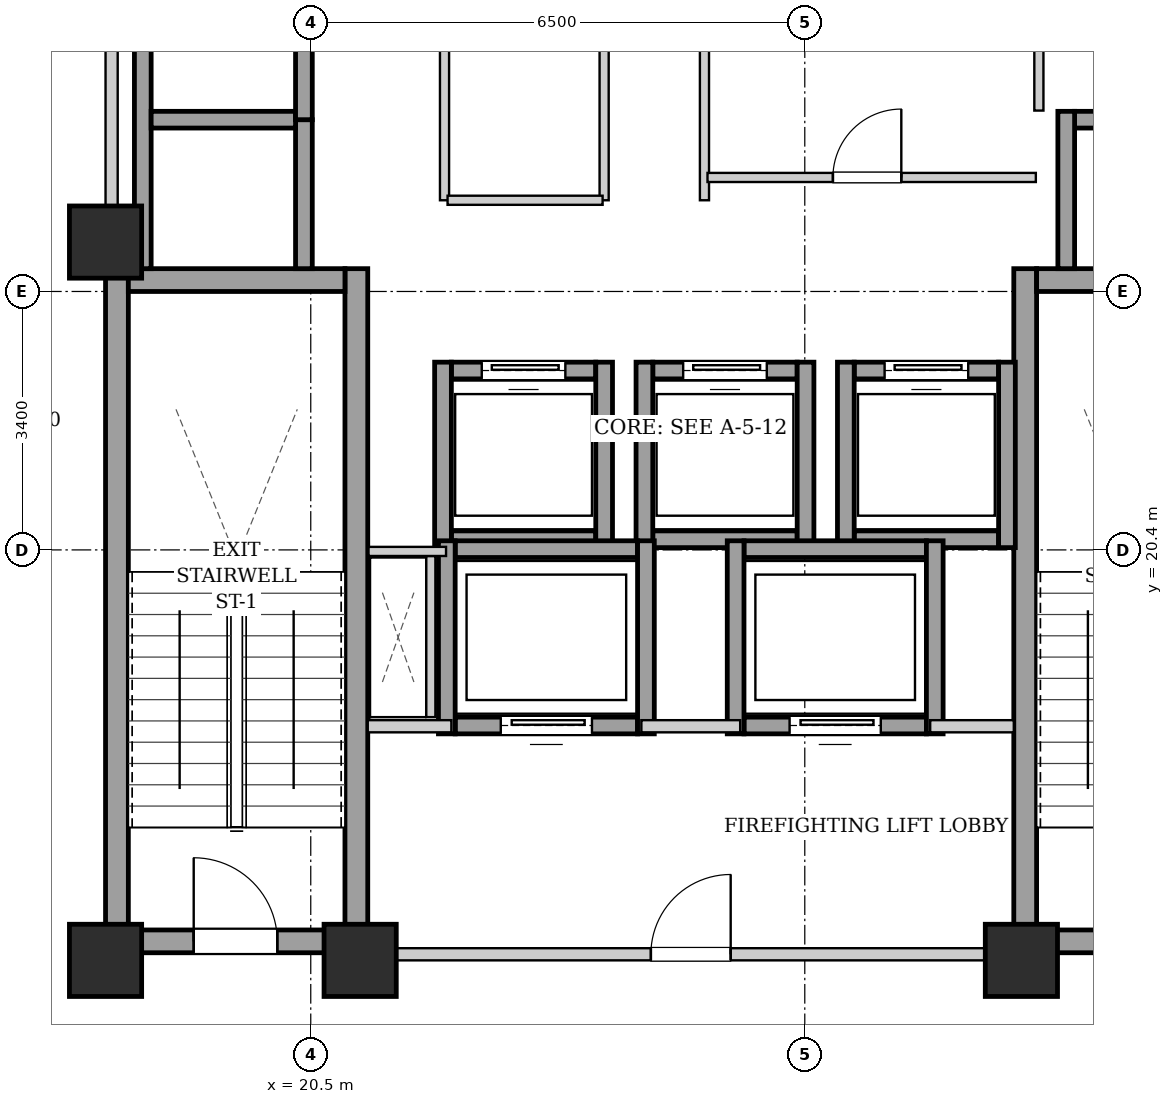
"""IFC4 building model, lengths in metres.
Left out: names, types, materials, properties, quantities, classifications, styles, units other than length and angle.
Written with IfcOpenShell. Run it as: python <this file> out.ifc"""

import sys

from ifc_helpers import new_model, si_unit, direction, frame, frame_2d, origin, origin_2d, place, context, subcontext, project, spatial, rectangle, extrude, element, fill, save


model = new_model("IFC4")
c1 = context("Model", 3, precision=1e-05, world=origin(), true_north=direction((0.0, 1.0)))
c2 = subcontext(c1, "Body", "Model", "MODEL_VIEW")
j1 = project(units=[si_unit("LENGTHUNIT", "METRE"), si_unit("PLANEANGLEUNIT", "RADIAN")], contexts=[c1])
p1 = place(None, origin())
s1 = spatial("IfcSite", under=j1, at=p1, CompositionType="ELEMENT")
p2 = place(p1, origin())
s2 = spatial("IfcBuilding", under=s1, at=p2, CompositionType="ELEMENT")
p3 = place(p2, frame((0.0, 0.0, 169.9)))
s3 = spatial("IfcBuildingStorey", under=s2, at=p3, CompositionType="ELEMENT", Elevation=169.9)
for number, where, z_axis, x_axis in (
    (1, (17.8, 15.0, 0.0), (0.0, 0.0, 1.0), (1.0, 0.0, 0.0)),
    (2, (21.15, 15.0, 0.0), (0.0, 0.0, 1.0), (1.0, 0.0, 0.0)),
    (3, (29.85, 15.0, 0.0), (0.0, 0.0, 1.0), (1.0, 0.0, 0.0)),
    (4, (17.8, 24.45, 0.0), (0.0, 0.0, 1.0), (1.0, 0.0, 0.0)),
):
    element("IfcColumn", number, at=place(p3, frame(where, z_axis=z_axis, x_axis=x_axis)), inside=s3, PredefinedType="COLUMN", context=c2, shape_type="SweptSolid", body=[
        extrude(rectangle(XDim=0.95, YDim=0.95, at=origin_2d()), origin(), (0.0, 0.0, 1.0), 4.5),
    ])
for number, where, z_axis, x_axis in (
    (5, (17.95, 15.1, 0.0), (0.0, 0.0, 1.0), (0.0, 1.0, 0.0)),
    (6, (21.1, 15.1, 0.0), (0.0, 0.0, 1.0), (0.0, 1.0, 0.0)),
):
    element("IfcWall", number, at=place(p3, frame(where, z_axis=z_axis, x_axis=x_axis)), inside=s3, PredefinedType="SHEAR", context=c2, shape_type="SweptSolid", body=[
        extrude(rectangle(XDim=9.0, YDim=0.3, at=frame_2d((4.5, 0.0))), origin(), (0.0, 0.0, 1.0), 4.18),
    ])
p4 = place(p3, frame((18.1, 23.95, 0.0), z_axis=(0.0, 0.0, 1.0), x_axis=(1.0, 0.0, 0.0)))
e7 = element("IfcWall", 7, at=p4, inside=s3, PredefinedType="SHEAR", context=c2, shape_type="SweptSolid", body=[
    extrude(rectangle(XDim=2.85, YDim=0.3, at=frame_2d((1.425, 0.0))), origin(), (0.0, 0.0, 1.0), 4.18),
])
p5 = place(p3, frame((18.1, 15.25, 0.0), z_axis=(0.0, 0.0, 1.0), x_axis=(1.0, 0.0, 0.0)))
e8 = element("IfcWall", 8, at=p5, inside=s3, PredefinedType="SHEAR", context=c2, shape_type="SweptSolid", body=[
    extrude(rectangle(XDim=2.85, YDim=0.3, at=frame_2d((1.425, 0.0))), origin(), (0.0, 0.0, 1.0), 4.18),
])
p6 = place(p5, frame((0.86, 0.0, 0.0)))
e9 = element("IfcOpeningElement", 9, at=p6, cuts=e8, PredefinedType="OPENING", context=c2, shape_type="SweptSolid", body=[
    extrude(rectangle(XDim=1.1, YDim=2.05, at=frame_2d((0.55, 1.025))), frame((0.0, 0.16, 0.0), z_axis=(0.0, -1.0, 0.0), x_axis=(1.0, 0.0, 0.0)), (0.0, 0.0, 1.0), 0.32),
])
p7 = place(p3, frame((29.9, 15.1, 0.0), z_axis=(0.0, 0.0, 1.0), x_axis=(0.0, 1.0, 0.0)))
e10 = element("IfcWall", 10, at=p7, inside=s3, PredefinedType="SHEAR", context=c2, shape_type="SweptSolid", body=[
    extrude(rectangle(XDim=9.0, YDim=0.3, at=frame_2d((4.5, 0.0))), origin(), (0.0, 0.0, 1.0), 4.18),
])
p8 = place(p3, frame((30.05, 23.95, 0.0), z_axis=(0.0, 0.0, 1.0), x_axis=(1.0, 0.0, 0.0)))
e11 = element("IfcWall", 11, at=p8, inside=s3, PredefinedType="SHEAR", context=c2, shape_type="SweptSolid", body=[
    extrude(rectangle(XDim=2.85, YDim=0.3, at=frame_2d((1.425, 0.0))), origin(), (0.0, 0.0, 1.0), 4.18),
])
p9 = place(p3, frame((30.05, 15.25, 0.0), z_axis=(0.0, 0.0, 1.0), x_axis=(1.0, 0.0, 0.0)))
e12 = element("IfcWall", 12, at=p9, inside=s3, PredefinedType="SHEAR", context=c2, shape_type="SweptSolid", body=[
    extrude(rectangle(XDim=2.85, YDim=0.3, at=frame_2d((1.425, 0.0))), origin(), (0.0, 0.0, 1.0), 4.18),
])
p10 = place(p9, frame((0.86, 0.0, 0.0)))
e13 = element("IfcOpeningElement", 13, at=p10, cuts=e12, PredefinedType="OPENING", context=c2, shape_type="SweptSolid", body=[
    extrude(rectangle(XDim=1.1, YDim=2.05, at=frame_2d((0.55, 1.025))), frame((0.0, 0.16, 0.0), z_axis=(0.0, -1.0, 0.0), x_axis=(1.0, 0.0, 0.0)), (0.0, 0.0, 1.0), 0.32),
])
p11 = place(p3, frame((22.35, 20.54, 0.0), z_axis=(0.0, 0.0, 1.0), x_axis=(1.0, 0.0, 0.0)))
e14 = element("IfcWall", 14, at=p11, inside=s3, PredefinedType="SHEAR", context=c2, shape_type="SweptSolid", body=[
    extrude(rectangle(XDim=1.9, YDim=0.22, at=frame_2d((0.95, 0.0))), origin(), (0.0, 0.0, 1.0), 4.18),
])
p12 = place(p3, frame((22.35, 22.76, 0.0), z_axis=(0.0, 0.0, 1.0), x_axis=(1.0, 0.0, 0.0)))
e15 = element("IfcWall", 15, at=p12, inside=s3, PredefinedType="SHEAR", context=c2, shape_type="SweptSolid", body=[
    extrude(rectangle(XDim=1.9, YDim=0.22, at=frame_2d((0.95, 0.0))), origin(), (0.0, 0.0, 1.0), 4.18),
])
p13 = place(p12, frame((0.4, 0.0, 0.0)))
e16 = element("IfcOpeningElement", 16, at=p13, cuts=e15, PredefinedType="OPENING", context=c2, shape_type="SweptSolid", body=[
    extrude(rectangle(XDim=1.1, YDim=2.15, at=frame_2d((0.55, 1.075))), frame((0.0, 0.12, 0.0), z_axis=(0.0, -1.0, 0.0), x_axis=(1.0, 0.0, 0.0)), (0.0, 0.0, 1.0), 0.24),
])
for number, where, z_axis, x_axis in (
    (17, (22.24, 20.43, 0.0), (0.0, 0.0, 1.0), (0.0, 1.0, 0.0)),
    (18, (24.36, 20.43, 0.0), (0.0, 0.0, 1.0), (0.0, 1.0, 0.0)),
):
    element("IfcWall", number, at=place(p3, frame(where, z_axis=z_axis, x_axis=x_axis)), inside=s3, PredefinedType="SHEAR", context=c2, shape_type="SweptSolid", body=[
        extrude(rectangle(XDim=2.44, YDim=0.22, at=frame_2d((1.22, 0.0))), origin(), (0.0, 0.0, 1.0), 4.18),
    ])
p14 = place(p3, frame((25.0, 20.54, 0.0), z_axis=(0.0, 0.0, 1.0), x_axis=(1.0, 0.0, 0.0)))
e19 = element("IfcWall", 19, at=p14, inside=s3, PredefinedType="SHEAR", context=c2, shape_type="SweptSolid", body=[
    extrude(rectangle(XDim=1.9, YDim=0.22, at=frame_2d((0.95, 0.0))), origin(), (0.0, 0.0, 1.0), 4.18),
])
p15 = place(p3, frame((25.0, 22.76, 0.0), z_axis=(0.0, 0.0, 1.0), x_axis=(1.0, 0.0, 0.0)))
e20 = element("IfcWall", 20, at=p15, inside=s3, PredefinedType="SHEAR", context=c2, shape_type="SweptSolid", body=[
    extrude(rectangle(XDim=1.9, YDim=0.22, at=frame_2d((0.95, 0.0))), origin(), (0.0, 0.0, 1.0), 4.18),
])
p16 = place(p15, frame((0.4, 0.0, 0.0)))
e21 = element("IfcOpeningElement", 21, at=p16, cuts=e20, PredefinedType="OPENING", context=c2, shape_type="SweptSolid", body=[
    extrude(rectangle(XDim=1.1, YDim=2.15, at=frame_2d((0.55, 1.075))), frame((0.0, 0.12, 0.0), z_axis=(0.0, -1.0, 0.0), x_axis=(1.0, 0.0, 0.0)), (0.0, 0.0, 1.0), 0.24),
])
for number, where, z_axis, x_axis in (
    (22, (24.89, 20.43, 0.0), (0.0, 0.0, 1.0), (0.0, 1.0, 0.0)),
    (23, (27.01, 20.43, 0.0), (0.0, 0.0, 1.0), (0.0, 1.0, 0.0)),
):
    element("IfcWall", number, at=place(p3, frame(where, z_axis=z_axis, x_axis=x_axis)), inside=s3, PredefinedType="SHEAR", context=c2, shape_type="SweptSolid", body=[
        extrude(rectangle(XDim=2.44, YDim=0.22, at=frame_2d((1.22, 0.0))), origin(), (0.0, 0.0, 1.0), 4.18),
    ])
p17 = place(p3, frame((27.65, 20.54, 0.0), z_axis=(0.0, 0.0, 1.0), x_axis=(1.0, 0.0, 0.0)))
e24 = element("IfcWall", 24, at=p17, inside=s3, PredefinedType="SHEAR", context=c2, shape_type="SweptSolid", body=[
    extrude(rectangle(XDim=1.9, YDim=0.22, at=frame_2d((0.95, 0.0))), origin(), (0.0, 0.0, 1.0), 4.18),
])
p18 = place(p3, frame((27.65, 22.76, 0.0), z_axis=(0.0, 0.0, 1.0), x_axis=(1.0, 0.0, 0.0)))
e25 = element("IfcWall", 25, at=p18, inside=s3, PredefinedType="SHEAR", context=c2, shape_type="SweptSolid", body=[
    extrude(rectangle(XDim=1.9, YDim=0.22, at=frame_2d((0.95, 0.0))), origin(), (0.0, 0.0, 1.0), 4.18),
])
p19 = place(p18, frame((0.4, 0.0, 0.0)))
e26 = element("IfcOpeningElement", 26, at=p19, cuts=e25, PredefinedType="OPENING", context=c2, shape_type="SweptSolid", body=[
    extrude(rectangle(XDim=1.1, YDim=2.15, at=frame_2d((0.55, 1.075))), frame((0.0, 0.12, 0.0), z_axis=(0.0, -1.0, 0.0), x_axis=(1.0, 0.0, 0.0)), (0.0, 0.0, 1.0), 0.24),
])
for number, where, z_axis, x_axis in (
    (27, (27.54, 20.43, 0.0), (0.0, 0.0, 1.0), (0.0, 1.0, 0.0)),
    (28, (29.66, 20.43, 0.0), (0.0, 0.0, 1.0), (0.0, 1.0, 0.0)),
):
    element("IfcWall", number, at=place(p3, frame(where, z_axis=z_axis, x_axis=x_axis)), inside=s3, PredefinedType="SHEAR", context=c2, shape_type="SweptSolid", body=[
        extrude(rectangle(XDim=2.44, YDim=0.22, at=frame_2d((1.22, 0.0))), origin(), (0.0, 0.0, 1.0), 4.18),
    ])
p20 = place(p3, frame((18.29, 24.1, 0.0), z_axis=(0.0, 0.0, 1.0), x_axis=(0.0, 1.0, 0.0)))
e29 = element("IfcWall", 29, at=p20, inside=s3, PredefinedType="SHEAR", context=c2, shape_type="SweptSolid", body=[
    extrude(rectangle(XDim=4.14, YDim=0.22, at=frame_2d((2.07, 0.0))), origin(), (0.0, 0.0, 1.0), 4.18),
])
p21 = place(p3, frame((20.41, 24.1, 0.0), z_axis=(0.0, 0.0, 1.0), x_axis=(0.0, 1.0, 0.0)))
e30 = element("IfcWall", 30, at=p21, inside=s3, PredefinedType="SHEAR", context=c2, shape_type="SweptSolid", body=[
    extrude(rectangle(XDim=1.96, YDim=0.22, at=frame_2d((0.98, 0.0))), origin(), (0.0, 0.0, 1.0), 4.18),
])
p22 = place(p3, frame((18.4, 26.06, 0.0), z_axis=(0.0, 0.0, 1.0), x_axis=(1.0, 0.0, 0.0)))
e31 = element("IfcWall", 31, at=p22, inside=s3, PredefinedType="SHEAR", context=c2, shape_type="SweptSolid", body=[
    extrude(rectangle(XDim=1.9, YDim=0.22, at=frame_2d((0.95, 0.0))), origin(), (0.0, 0.0, 1.0), 4.18),
])
p23 = place(p3, frame((20.41, 26.06, 0.0), z_axis=(0.0, 0.0, 1.0), x_axis=(0.0, 1.0, 0.0)))
e32 = element("IfcWall", 32, at=p23, inside=s3, PredefinedType="SHEAR", context=c2, shape_type="SweptSolid", body=[
    extrude(rectangle(XDim=2.18, YDim=0.22, at=frame_2d((1.09, 0.0))), origin(), (0.0, 0.0, 1.0), 4.18),
])
p24 = place(p3, frame((30.55, 26.06, 0.0), z_axis=(0.0, 0.0, 1.0), x_axis=(1.0, 0.0, 0.0)))
e33 = element("IfcWall", 33, at=p24, inside=s3, PredefinedType="SHEAR", context=c2, shape_type="SweptSolid", body=[
    extrude(rectangle(XDim=1.9, YDim=0.22, at=frame_2d((0.95, 0.0))), origin(), (0.0, 0.0, 1.0), 4.18),
])
p25 = place(p3, frame((30.44, 24.1, 0.0), z_axis=(0.0, 0.0, 1.0), x_axis=(0.0, 1.0, 0.0)))
e34 = element("IfcWall", 34, at=p25, inside=s3, PredefinedType="SHEAR", context=c2, shape_type="SweptSolid", body=[
    extrude(rectangle(XDim=2.07, YDim=0.22, at=frame_2d((1.035, 0.0))), origin(), (0.0, 0.0, 1.0), 4.18),
])
p26 = place(p3, frame((22.4, 18.09, 0.0), z_axis=(0.0, 0.0, 1.0), x_axis=(1.0, 0.0, 0.0)))
e35 = element("IfcWall", 35, at=p26, inside=s3, PredefinedType="SHEAR", context=c2, shape_type="SweptSolid", body=[
    extrude(rectangle(XDim=2.4, YDim=0.22, at=frame_2d((1.2, 0.0))), origin(), (0.0, 0.0, 1.0), 4.18),
])
p27 = place(p26, frame((0.6, 0.0, 0.0)))
e36 = element("IfcOpeningElement", 36, at=p27, cuts=e35, PredefinedType="OPENING", context=c2, shape_type="SweptSolid", body=[
    extrude(rectangle(XDim=1.2, YDim=2.15, at=frame_2d((0.6, 1.075))), frame((0.0, 0.12, 0.0), z_axis=(0.0, -1.0, 0.0), x_axis=(1.0, 0.0, 0.0)), (0.0, 0.0, 1.0), 0.24),
])
p28 = place(p3, frame((22.4, 20.41, 0.0), z_axis=(0.0, 0.0, 1.0), x_axis=(1.0, 0.0, 0.0)))
e37 = element("IfcWall", 37, at=p28, inside=s3, PredefinedType="SHEAR", context=c2, shape_type="SweptSolid", body=[
    extrude(rectangle(XDim=2.4, YDim=0.22, at=frame_2d((1.2, 0.0))), origin(), (0.0, 0.0, 1.0), 4.18),
])
for number, where, z_axis, x_axis in (
    (38, (22.29, 17.98, 0.0), (0.0, 0.0, 1.0), (0.0, 1.0, 0.0)),
    (39, (24.91, 17.98, 0.0), (0.0, 0.0, 1.0), (0.0, 1.0, 0.0)),
):
    element("IfcWall", number, at=place(p3, frame(where, z_axis=z_axis, x_axis=x_axis)), inside=s3, PredefinedType="SHEAR", context=c2, shape_type="SweptSolid", body=[
        extrude(rectangle(XDim=2.54, YDim=0.22, at=frame_2d((1.27, 0.0))), origin(), (0.0, 0.0, 1.0), 4.18),
    ])
p29 = place(p3, frame((26.2, 18.09, 0.0), z_axis=(0.0, 0.0, 1.0), x_axis=(1.0, 0.0, 0.0)))
e40 = element("IfcWall", 40, at=p29, inside=s3, PredefinedType="SHEAR", context=c2, shape_type="SweptSolid", body=[
    extrude(rectangle(XDim=2.4, YDim=0.22, at=frame_2d((1.2, 0.0))), origin(), (0.0, 0.0, 1.0), 4.18),
])
p30 = place(p29, frame((0.6, 0.0, 0.0)))
e41 = element("IfcOpeningElement", 41, at=p30, cuts=e40, PredefinedType="OPENING", context=c2, shape_type="SweptSolid", body=[
    extrude(rectangle(XDim=1.2, YDim=2.15, at=frame_2d((0.6, 1.075))), frame((0.0, 0.12, 0.0), z_axis=(0.0, -1.0, 0.0), x_axis=(1.0, 0.0, 0.0)), (0.0, 0.0, 1.0), 0.24),
])
p31 = place(p3, frame((26.2, 20.41, 0.0), z_axis=(0.0, 0.0, 1.0), x_axis=(1.0, 0.0, 0.0)))
e42 = element("IfcWall", 42, at=p31, inside=s3, PredefinedType="SHEAR", context=c2, shape_type="SweptSolid", body=[
    extrude(rectangle(XDim=2.4, YDim=0.22, at=frame_2d((1.2, 0.0))), origin(), (0.0, 0.0, 1.0), 4.18),
])
for number, where, z_axis, x_axis in (
    (43, (26.09, 17.98, 0.0), (0.0, 0.0, 1.0), (0.0, 1.0, 0.0)),
    (44, (28.71, 17.98, 0.0), (0.0, 0.0, 1.0), (0.0, 1.0, 0.0)),
):
    element("IfcWall", number, at=place(p3, frame(where, z_axis=z_axis, x_axis=x_axis)), inside=s3, PredefinedType="SHEAR", context=c2, shape_type="SweptSolid", body=[
        extrude(rectangle(XDim=2.54, YDim=0.22, at=frame_2d((1.27, 0.0))), origin(), (0.0, 0.0, 1.0), 4.18),
    ])
p32 = place(p3, frame((21.25, 15.08, 0.0), z_axis=(0.0, 0.0, 1.0), x_axis=(1.0, 0.0, 0.0)))
e45 = element("IfcWall", 45, at=p32, inside=s3, PredefinedType="PARTITIONING", context=c2, shape_type="SweptSolid", body=[
    extrude(rectangle(XDim=8.5, YDim=0.16, at=frame_2d((4.25, 0.0))), origin(), (0.0, 0.0, 1.0), 4.18),
])
p33 = place(p32, frame((3.725, 0.0, 0.0)))
e46 = element("IfcOpeningElement", 46, at=p33, cuts=e45, PredefinedType="OPENING", context=c2, shape_type="SweptSolid", body=[
    extrude(rectangle(XDim=1.05, YDim=2.05, at=frame_2d((0.525, 1.025))), frame((0.0, 0.09, 0.0), z_axis=(0.0, -1.0, 0.0), x_axis=(1.0, 0.0, 0.0)), (0.0, 0.0, 1.0), 0.18),
])
p34 = place(p3, frame((21.25, 18.08, 0.0), z_axis=(0.0, 0.0, 1.0), x_axis=(1.0, 0.0, 0.0)))
e47 = element("IfcWall", 47, at=p34, inside=s3, PredefinedType="PARTITIONING", context=c2, shape_type="SweptSolid", body=[
    extrude(rectangle(XDim=1.1, YDim=0.16, at=frame_2d((0.55, 0.0))), origin(), (0.0, 0.0, 1.0), 4.18),
])
p35 = place(p3, frame((24.85, 18.08, 0.0), z_axis=(0.0, 0.0, 1.0), x_axis=(1.0, 0.0, 0.0)))
e48 = element("IfcWall", 48, at=p35, inside=s3, PredefinedType="PARTITIONING", context=c2, shape_type="SweptSolid", body=[
    extrude(rectangle(XDim=1.3, YDim=0.16, at=frame_2d((0.65, 0.0))), origin(), (0.0, 0.0, 1.0), 4.18),
])
p36 = place(p3, frame((28.65, 18.08, 0.0), z_axis=(0.0, 0.0, 1.0), x_axis=(1.0, 0.0, 0.0)))
e49 = element("IfcWall", 49, at=p36, inside=s3, PredefinedType="PARTITIONING", context=c2, shape_type="SweptSolid", body=[
    extrude(rectangle(XDim=1.1, YDim=0.16, at=frame_2d((0.55, 0.0))), origin(), (0.0, 0.0, 1.0), 4.18),
])
p37 = place(p3, frame((17.88, 24.12, 0.0), z_axis=(0.0, 0.0, 1.0), x_axis=(0.0, 1.0, 0.0)))
e50 = element("IfcWall", 50, at=p37, inside=s3, PredefinedType="PARTITIONING", context=c2, shape_type="SweptSolid", body=[
    extrude(rectangle(XDim=4.76, YDim=0.16, at=frame_2d((2.38, 0.0))), origin(), (0.0, 0.0, 1.0), 4.18),
])
p38 = place(p3, frame((22.08, 18.2, 0.0), z_axis=(0.0, 0.0, 1.0), x_axis=(0.0, 1.0, 0.0)))
e51 = element("IfcWall", 51, at=p38, inside=s3, PredefinedType="PARTITIONING", context=c2, shape_type="SweptSolid", body=[
    extrude(rectangle(XDim=2.12, YDim=0.12, at=frame_2d((1.06, 0.0))), origin(), (0.0, 0.0, 1.0), 4.18),
])
p39 = place(p3, frame((22.28, 20.38, 0.0), z_axis=(0.0, 0.0, 1.0), x_axis=(-1.0, 0.0, 0.0)))
e52 = element("IfcWall", 52, at=p39, inside=s3, PredefinedType="PARTITIONING", context=c2, shape_type="SweptSolid", body=[
    extrude(rectangle(XDim=1.02, YDim=0.12, at=frame_2d((0.51, 0.0))), origin(), (0.0, 0.0, 1.0), 4.18),
])
for number, where, z_axis, x_axis in (
    (53, (24.36, 25.0, 0.0), (0.0, 0.0, 1.0), (0.0, 1.0, 0.0)),
    (54, (25.68, 25.0, 0.0), (0.0, 0.0, 1.0), (0.0, 1.0, 0.0)),
):
    element("IfcWall", number, at=place(p3, frame(where, z_axis=z_axis, x_axis=x_axis)), inside=s3, PredefinedType="PARTITIONING", context=c2, shape_type="SweptSolid", body=[
        extrude(rectangle(XDim=3.87, YDim=0.12, at=frame_2d((1.935, 0.0))), origin(), (0.0, 0.0, 1.0), 4.18),
    ])
p40 = place(p3, frame((30.08, 26.18, 0.0), z_axis=(0.0, 0.0, 1.0), x_axis=(0.0, 1.0, 0.0)))
e55 = element("IfcWall", 55, at=p40, inside=s3, PredefinedType="PARTITIONING", context=c2, shape_type="SweptSolid", body=[
    extrude(rectangle(XDim=2.68, YDim=0.12, at=frame_2d((1.34, 0.0))), origin(), (0.0, 0.0, 1.0), 4.18),
])
p41 = place(p3, frame((22.26, 25.0, 0.0), z_axis=(0.0, 0.0, 1.0), x_axis=(0.0, 1.0, 0.0)))
e56 = element("IfcWall", 56, at=p41, inside=s3, PredefinedType="PARTITIONING", context=c2, shape_type="SweptSolid", body=[
    extrude(rectangle(XDim=3.86, YDim=0.12, at=frame_2d((1.93, 0.0))), origin(), (0.0, 0.0, 1.0), 4.18),
])
p42 = place(p3, frame((22.3, 25.0, 0.0), z_axis=(0.0, 0.0, 1.0), x_axis=(1.0, 0.0, 0.0)))
e57 = element("IfcWall", 57, at=p42, inside=s3, PredefinedType="PARTITIONING", context=c2, shape_type="SweptSolid", body=[
    extrude(rectangle(XDim=2.04, YDim=0.12, at=frame_2d((1.02, 0.0))), origin(), (0.0, 0.0, 1.0), 4.18),
])
p43 = place(p3, frame((25.72, 25.3, 0.0), z_axis=(0.0, 0.0, 1.0), x_axis=(1.0, 0.0, 0.0)))
e58 = element("IfcWall", 58, at=p43, inside=s3, PredefinedType="PARTITIONING", context=c2, shape_type="SweptSolid", body=[
    extrude(rectangle(XDim=4.32, YDim=0.12, at=frame_2d((2.16, 0.0))), origin(), (0.0, 0.0, 1.0), 4.18),
])
p44 = place(p43, frame((1.65, 0.0, 0.0)))
e59 = element("IfcOpeningElement", 59, at=p44, cuts=e58, PredefinedType="OPENING", context=c2, shape_type="SweptSolid", body=[
    extrude(rectangle(XDim=0.9, YDim=2.05, at=frame_2d((0.45, 1.025))), frame((0.0, 0.07, 0.0), z_axis=(0.0, -1.0, 0.0), x_axis=(1.0, 0.0, 0.0)), (0.0, 0.0, 1.0), 0.14),
])
p45 = place(p6, origin())
e60 = element("IfcDoor", 60, at=p45, inside=s3, OperationType="SINGLE_SWING_LEFT", PredefinedType="DOOR", context=c2, shape_type="SweptSolid", body=[
    extrude(rectangle(XDim=1.1, YDim=2.05, at=frame_2d((0.55, 1.025))), frame((0.0, 0.025, 0.0), z_axis=(0.0, -1.0, 0.0), x_axis=(1.0, 0.0, 0.0)), (0.0, 0.0, 1.0), 0.05),
])
fill(e9, e60)
p46 = place(p13, origin())
e61 = element("IfcDoor", 61, at=p46, inside=s3, OperationType="SLIDING_TO_LEFT", PredefinedType="DOOR", context=c2, shape_type="SweptSolid", body=[
    extrude(rectangle(XDim=1.1, YDim=2.15, at=frame_2d((0.55, 1.075))), frame((0.0, 0.025, 0.0), z_axis=(0.0, -1.0, 0.0), x_axis=(1.0, 0.0, 0.0)), (0.0, 0.0, 1.0), 0.05),
])
fill(e16, e61)
p47 = place(p16, origin())
e62 = element("IfcDoor", 62, at=p47, inside=s3, OperationType="SLIDING_TO_LEFT", PredefinedType="DOOR", context=c2, shape_type="SweptSolid", body=[
    extrude(rectangle(XDim=1.1, YDim=2.15, at=frame_2d((0.55, 1.075))), frame((0.0, 0.025, 0.0), z_axis=(0.0, -1.0, 0.0), x_axis=(1.0, 0.0, 0.0)), (0.0, 0.0, 1.0), 0.05),
])
fill(e21, e62)
p48 = place(p19, origin())
e63 = element("IfcDoor", 63, at=p48, inside=s3, OperationType="SLIDING_TO_LEFT", PredefinedType="DOOR", context=c2, shape_type="SweptSolid", body=[
    extrude(rectangle(XDim=1.1, YDim=2.15, at=frame_2d((0.55, 1.075))), frame((0.0, 0.025, 0.0), z_axis=(0.0, -1.0, 0.0), x_axis=(1.0, 0.0, 0.0)), (0.0, 0.0, 1.0), 0.05),
])
fill(e26, e63)
p49 = place(p27, origin())
e64 = element("IfcDoor", 64, at=p49, inside=s3, OperationType="SLIDING_TO_LEFT", PredefinedType="DOOR", context=c2, shape_type="SweptSolid", body=[
    extrude(rectangle(XDim=1.2, YDim=2.15, at=frame_2d((0.6, 1.075))), frame((0.0, 0.025, 0.0), z_axis=(0.0, -1.0, 0.0), x_axis=(1.0, 0.0, 0.0)), (0.0, 0.0, 1.0), 0.05),
])
fill(e36, e64)
p50 = place(p30, origin())
e65 = element("IfcDoor", 65, at=p50, inside=s3, OperationType="SLIDING_TO_LEFT", PredefinedType="DOOR", context=c2, shape_type="SweptSolid", body=[
    extrude(rectangle(XDim=1.2, YDim=2.15, at=frame_2d((0.6, 1.075))), frame((0.0, 0.025, 0.0), z_axis=(0.0, -1.0, 0.0), x_axis=(1.0, 0.0, 0.0)), (0.0, 0.0, 1.0), 0.05),
])
fill(e41, e65)
p51 = place(p33, origin())
e66 = element("IfcDoor", 66, at=p51, inside=s3, OperationType="SINGLE_SWING_RIGHT", PredefinedType="DOOR", context=c2, shape_type="SweptSolid", body=[
    extrude(rectangle(XDim=1.05, YDim=2.05, at=frame_2d((0.525, 1.025))), frame((0.0, 0.025, 0.0), z_axis=(0.0, -1.0, 0.0), x_axis=(1.0, 0.0, 0.0)), (0.0, 0.0, 1.0), 0.05),
])
fill(e46, e66)
p52 = place(p44, origin())
e67 = element("IfcDoor", 67, at=p52, inside=s3, OperationType="SINGLE_SWING_RIGHT", PredefinedType="DOOR", context=c2, shape_type="SweptSolid", body=[
    extrude(rectangle(XDim=0.9, YDim=2.05, at=frame_2d((0.45, 1.025))), frame((0.0, 0.025, 0.0), z_axis=(0.0, -1.0, 0.0), x_axis=(1.0, 0.0, 0.0)), (0.0, 0.0, 1.0), 0.05),
])
fill(e59, e67)
save(model, sys.argv[1])
